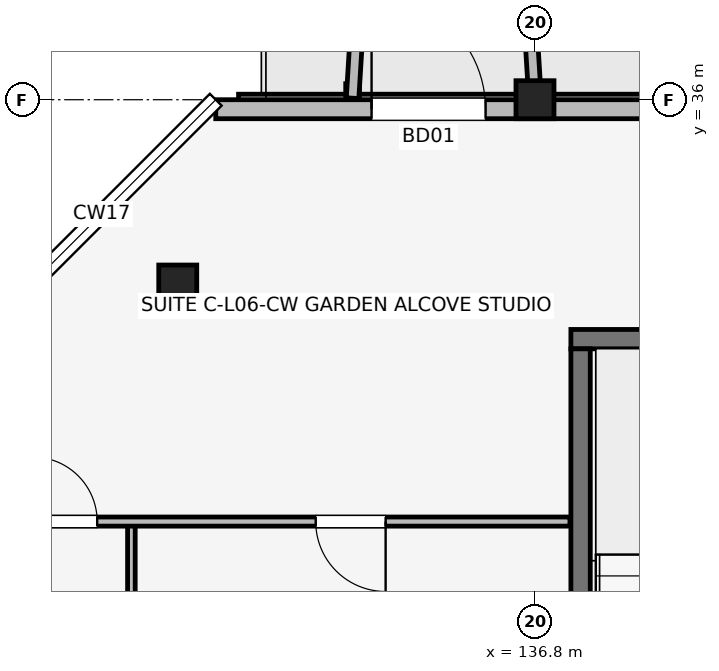
"""IFC4 building model, lengths in metres.
Left out: names, types, materials, properties, quantities, classifications, styles, units other than length and angle.
Written with IfcOpenShell. Run it as: python <this file> out.ifc"""

import sys

from ifc_helpers import new_model, si_unit, direction, frame, frame_2d, origin, origin_2d, place, context, subcontext, project, spatial, rectangle, extrude, element, fill, save


model = new_model("IFC4")
c1 = context("Model", 3, precision=1e-05, world=origin(), true_north=direction((0.0, 1.0)))
c2 = subcontext(c1, "Body", "Model", "MODEL_VIEW")
j1 = project(units=[si_unit("LENGTHUNIT", "METRE"), si_unit("PLANEANGLEUNIT", "RADIAN")], contexts=[c1])
p1 = place(None, origin())
s1 = spatial("IfcSite", under=j1, at=p1, CompositionType="ELEMENT")
p2 = place(p1, origin())
s2 = spatial("IfcBuilding", under=s1, at=p2, CompositionType="ELEMENT")
p3 = place(p2, frame((0.0, 0.0, 21.3)))
s3 = spatial("IfcBuildingStorey", under=s2, at=p3, CompositionType="ELEMENT", Elevation=21.3)
p4 = place(p3, frame((132.1, 33.5, 0.0), z_axis=(0.0, 0.0, 1.0), x_axis=(1.0, 0.0, 0.0)))
e1 = element("IfcColumn", 1, at=p4, inside=s3, PredefinedType="COLUMN", context=c2, shape_type="SweptSolid", body=[
    extrude(rectangle(XDim=0.5, YDim=0.65, at=origin_2d()), origin(), (0.0, 0.0, 1.0), 3.15),
])
p5 = place(p3, frame((136.8, 36.0, 0.0), z_axis=(0.0, 0.0, 1.0), x_axis=(1.0, 0.0, 0.0)))
e2 = element("IfcColumn", 2, at=p5, inside=s3, PredefinedType="COLUMN", context=c2, shape_type="SweptSolid", body=[
    extrude(rectangle(XDim=0.5, YDim=0.5, at=origin_2d()), origin(), (0.0, 0.0, 1.0), 3.15),
])
p6 = place(p3, frame((137.272, 32.85, 0.0), z_axis=(0.0, 0.0, 1.0), x_axis=(1.0, 0.0, 0.0)))
e3 = element("IfcWall", 3, at=p6, inside=s3, PredefinedType="SHEAR", context=c2, shape_type="SweptSolid", body=[
    extrude(rectangle(XDim=3.305, YDim=0.255, at=frame_2d((1.652, 0.0))), origin(), (0.0, 0.0, 1.0), 3.15),
])
p7 = place(p3, frame((137.4, 26.427, 0.0), z_axis=(0.0, 0.0, 1.0), x_axis=(0.0, 1.0, 0.0)))
e4 = element("IfcWall", 4, at=p7, inside=s3, PredefinedType="SHEAR", context=c2, shape_type="SweptSolid", body=[
    extrude(rectangle(XDim=6.295, YDim=0.255, at=frame_2d((3.147, 0.0))), origin(), (0.0, 0.0, 1.0), 3.15),
])
p8 = place(p3, frame((162.6, 35.875, 0.0), z_axis=(0.0, 0.0, 1.0), x_axis=(-1.0, 0.0, 0.0)))
e5 = element("IfcWall", 5, at=p8, inside=s3, PredefinedType="SOLIDWALL", context=c2, shape_type="SweptSolid", body=[
    extrude(rectangle(XDim=30.0, YDim=0.25, at=frame_2d((15.0, 0.0))), origin(), (0.0, 0.0, 1.0), 2.43),
])
p9 = place(p8, frame((27.95, 0.0, 0.0), z_axis=(0.0, 0.0, 1.0), x_axis=(-1.0, 0.0, 0.0)))
e6 = element("IfcOpeningElement", 6, at=p9, cuts=e5, PredefinedType="OPENING", context=c2, shape_type="SweptSolid", body=[
    extrude(rectangle(XDim=1.5, YDim=2.15, at=frame_2d((0.75, 1.075))), frame((0.0, 0.135, 0.0), z_axis=(0.0, -1.0, 0.0), x_axis=(1.0, 0.0, 0.0)), (0.0, 0.0, 1.0), 0.27),
])
p10 = place(p8, frame((3.55, 0.0, 0.0), z_axis=(0.0, 0.0, 1.0), x_axis=(-1.0, 0.0, 0.0)))
e7 = element("IfcOpeningElement", 7, at=p10, cuts=e5, PredefinedType="OPENING", context=c2, shape_type="SweptSolid", body=[
    extrude(rectangle(XDim=1.5, YDim=2.15, at=frame_2d((0.75, 1.075))), frame((0.0, 0.135, 0.0), z_axis=(0.0, -1.0, 0.0), x_axis=(1.0, 0.0, 0.0)), (0.0, 0.0, 1.0), 0.27),
])
p11 = place(p8, frame((14.625, 0.0, 0.5)))
e8 = element("IfcOpeningElement", 8, at=p11, cuts=e5, PredefinedType="OPENING", context=c2, shape_type="SweptSolid", body=[
    extrude(rectangle(XDim=0.75, YDim=1.75, at=frame_2d((0.375, 0.875))), frame((0.0, 0.135, 0.0), z_axis=(0.0, -1.0, 0.0), x_axis=(1.0, 0.0, 0.0)), (0.0, 0.0, 1.0), 0.27),
])
p12 = place(p8, frame((9.195, 0.0, 0.7)))
e9 = element("IfcOpeningElement", 9, at=p12, cuts=e5, PredefinedType="OPENING", context=c2, shape_type="SweptSolid", body=[
    extrude(rectangle(XDim=1.72, YDim=1.6, at=frame_2d((0.86, 0.8))), frame((0.0, 0.135, 0.0), z_axis=(0.0, -1.0, 0.0), x_axis=(1.0, 0.0, 0.0)), (0.0, 0.0, 1.0), 0.27),
])
p13 = place(p8, frame((19.015, 0.0, 0.7)))
e10 = element("IfcOpeningElement", 10, at=p13, cuts=e5, PredefinedType="OPENING", context=c2, shape_type="SweptSolid", body=[
    extrude(rectangle(XDim=1.86, YDim=1.6, at=frame_2d((0.93, 0.8))), frame((0.0, 0.135, 0.0), z_axis=(0.0, -1.0, 0.0), x_axis=(1.0, 0.0, 0.0)), (0.0, 0.0, 1.0), 0.27),
])
for number, where, z_axis, x_axis in (
    (11, (134.4, 36.02, 0.0), (0.0, 0.0, 1.0), (0.061, 0.998, 0.0)),
    (12, (136.8, 36.02, 0.0), (0.0, 0.0, 1.0), (-0.061, 0.998, 0.0)),
):
    element("IfcWall", number, at=place(p3, frame(where, z_axis=z_axis, x_axis=x_axis)), inside=s3, PredefinedType="ELEMENTEDWALL", context=c2, shape_type="SweptSolid", body=[
        extrude(rectangle(XDim=1.964, YDim=0.165, at=frame_2d((0.982, 0.0))), origin(), (0.0, 0.0, 1.0), 2.95),
    ])
p14 = place(p3, frame((131.49, 26.1, 0.0), z_axis=(0.0, 0.0, 1.0), x_axis=(0.0, 1.0, 0.0)))
e13 = element("IfcWall", 13, at=p14, inside=s3, PredefinedType="PARTITIONING", context=c2, shape_type="SweptSolid", body=[
    extrude(rectangle(XDim=4.35, YDim=0.1, at=frame_2d((2.175, 0.0))), origin(), (0.0, 0.0, 1.0), 2.38),
])
p15 = place(p3, frame((129.74, 30.45, 0.0), z_axis=(0.0, 0.0, 1.0), x_axis=(1.0, 0.0, 0.0)))
e14 = element("IfcWall", 14, at=p15, inside=s3, PredefinedType="PARTITIONING", context=c2, shape_type="SweptSolid", body=[
    extrude(rectangle(XDim=7.52, YDim=0.12, at=frame_2d((3.76, 0.0))), origin(), (0.0, 0.0, 1.0), 2.38),
])
p16 = place(p15, frame((0.45, 0.0, 0.0)))
e15 = element("IfcOpeningElement", 15, at=p16, cuts=e14, PredefinedType="OPENING", context=c2, shape_type="SweptSolid", body=[
    extrude(rectangle(XDim=0.85, YDim=2.08, at=frame_2d((0.425, 1.04))), frame((0.0, 0.07, 0.0), z_axis=(0.0, -1.0, 0.0), x_axis=(1.0, 0.0, 0.0)), (0.0, 0.0, 1.0), 0.14),
])
p17 = place(p15, frame((5.095, 0.0, 0.0), z_axis=(0.0, 0.0, 1.0), x_axis=(-1.0, 0.0, 0.0)))
e16 = element("IfcOpeningElement", 16, at=p17, cuts=e14, PredefinedType="OPENING", context=c2, shape_type="SweptSolid", body=[
    extrude(rectangle(XDim=0.92, YDim=2.08, at=frame_2d((0.46, 1.04))), frame((0.0, 0.07, 0.0), z_axis=(0.0, -1.0, 0.0), x_axis=(1.0, 0.0, 0.0)), (0.0, 0.0, 1.0), 0.14),
])
p18 = place(p9, origin())
e17 = element("IfcDoor", 17, at=p18, inside=s3, OperationType="SINGLE_SWING_RIGHT", PredefinedType="DOOR", context=c2, shape_type="SweptSolid", body=[
    extrude(rectangle(XDim=1.5, YDim=2.15, at=frame_2d((0.75, 1.075))), frame((0.0, 0.025, 0.0), z_axis=(0.0, -1.0, 0.0), x_axis=(1.0, 0.0, 0.0)), (0.0, 0.0, 1.0), 0.05),
])
fill(e6, e17)
p19 = place(p16, origin())
e18 = element("IfcDoor", 18, at=p19, inside=s3, OperationType="SINGLE_SWING_LEFT", PredefinedType="DOOR", context=c2, shape_type="SweptSolid", body=[
    extrude(rectangle(XDim=0.85, YDim=2.08, at=frame_2d((0.425, 1.04))), frame((0.0, 0.025, 0.0), z_axis=(0.0, -1.0, 0.0), x_axis=(1.0, 0.0, 0.0)), (0.0, 0.0, 1.0), 0.05),
])
fill(e15, e18)
p20 = place(p17, origin())
e19 = element("IfcDoor", 19, at=p20, inside=s3, OperationType="SINGLE_SWING_RIGHT", PredefinedType="DOOR", context=c2, shape_type="SweptSolid", body=[
    extrude(rectangle(XDim=0.92, YDim=2.08, at=frame_2d((0.46, 1.04))), frame((0.0, 0.025, 0.0), z_axis=(0.0, -1.0, 0.0), x_axis=(1.0, 0.0, 0.0)), (0.0, 0.0, 1.0), 0.05),
])
fill(e16, e19)
save(model, sys.argv[1])
